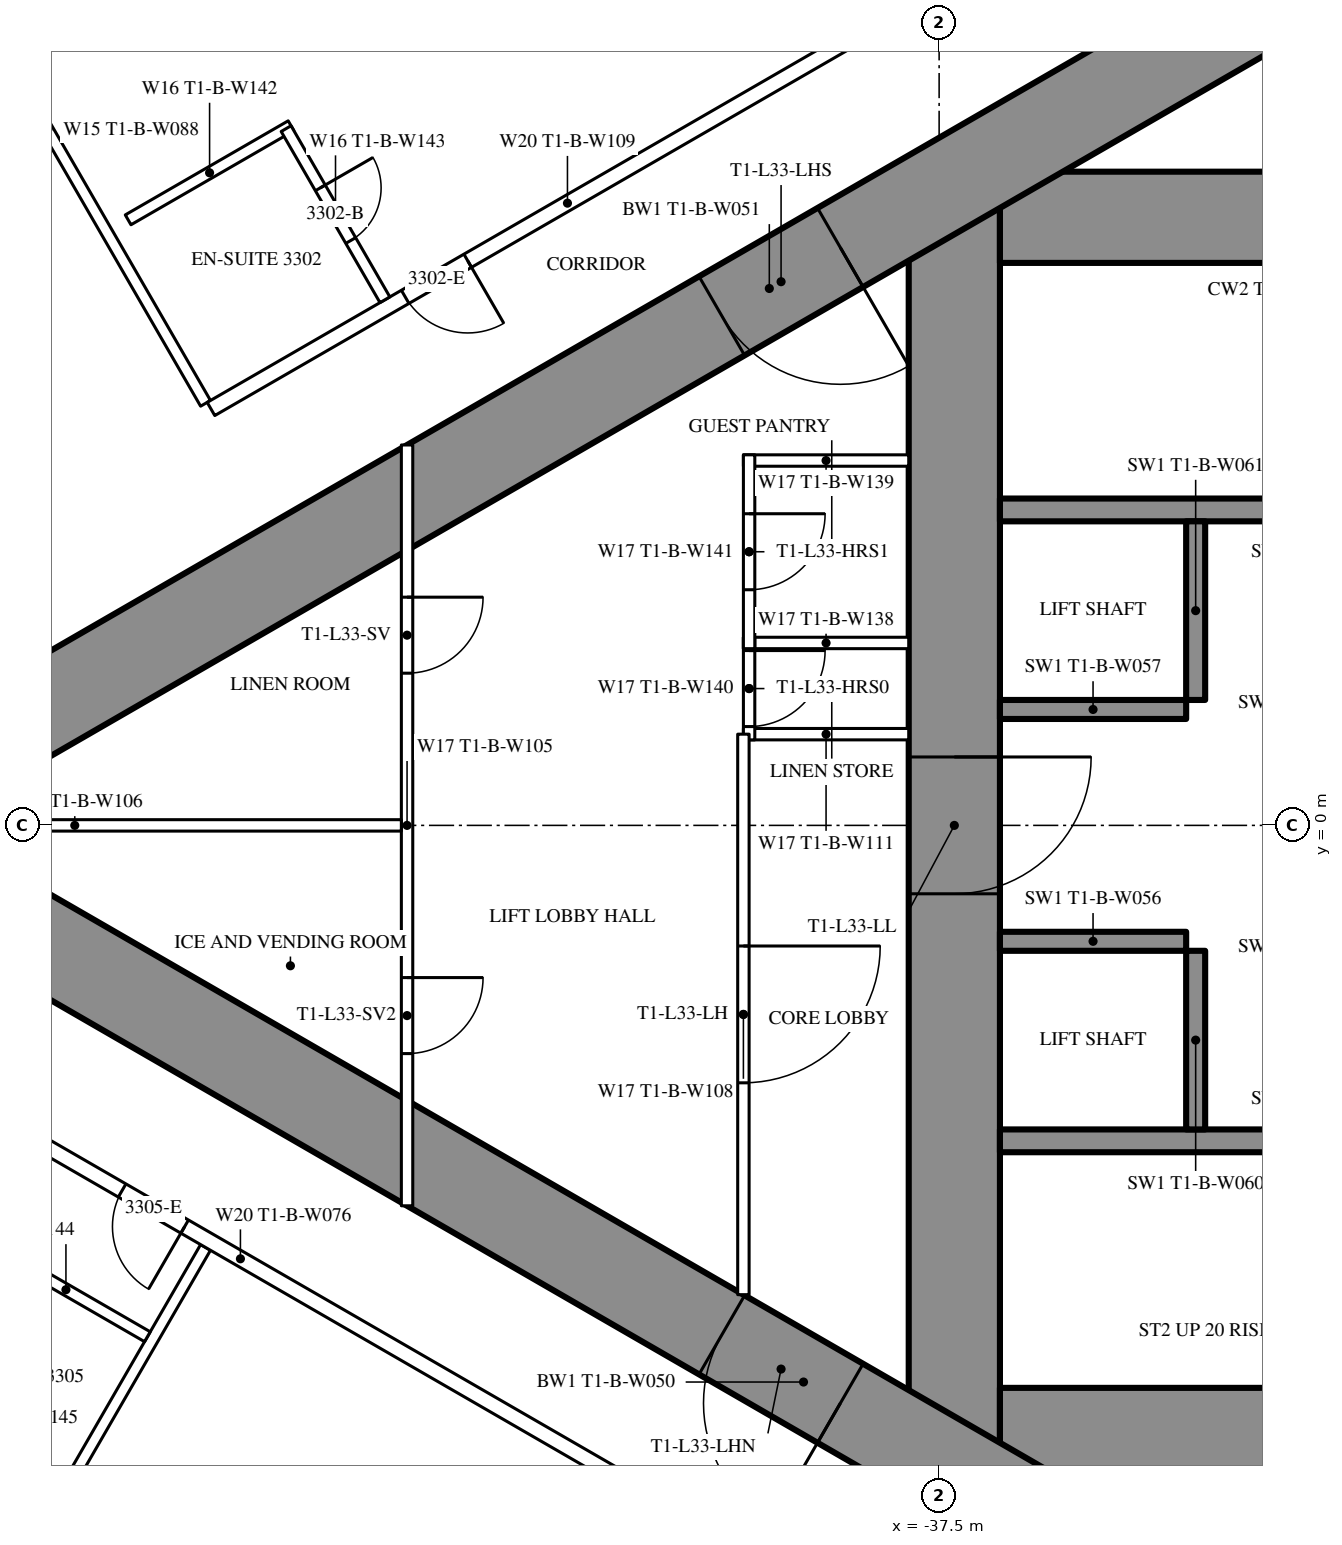
"""IFC4 building model, lengths in metres.
Left out: names, types, materials, properties, quantities, classifications, styles, units other than length and angle.
Written with IfcOpenShell. Run it as: python <this file> out.ifc"""

import sys

from ifc_helpers import new_model, si_unit, direction, frame, frame_2d, origin, place, context, subcontext, project, spatial, rectangle, extrude, element, fill, save


model = new_model("IFC4")
c1 = context("Model", 3, precision=1e-05, world=origin(), true_north=direction((0.0, 1.0)))
c2 = subcontext(c1, "Body", "Model", "MODEL_VIEW")
j1 = project(units=[si_unit("LENGTHUNIT", "METRE"), si_unit("PLANEANGLEUNIT", "RADIAN")], contexts=[c1])
p1 = place(None, origin())
s1 = spatial("IfcSite", under=j1, at=p1, CompositionType="ELEMENT")
p2 = place(p1, origin())
s2 = spatial("IfcBuilding", under=s1, at=p2, CompositionType="ELEMENT")
p3 = place(p2, frame((0.0, 0.0, 125.6)))
s3 = spatial("IfcBuildingStorey", under=s2, at=p3, CompositionType="ELEMENT", Elevation=125.6)
p4 = place(p3, frame((-37.3, 8.6, 0.0), z_axis=(0.0, 0.0, 1.0), x_axis=(0.0, -1.0, 0.0)))
e1 = element("IfcWall", 1, at=p4, inside=s3, PredefinedType="SHEAR", context=c2, shape_type="SweptSolid", body=[
    extrude(rectangle(XDim=17.2, YDim=1.2, at=frame_2d((8.6, 0.0))), origin(), (0.0, 0.0, 1.0), 3.5),
])
p5 = place(p4, frame((7.7, 0.0, 0.0)))
e2 = element("IfcOpeningElement", 2, at=p5, cuts=e1, PredefinedType="OPENING", context=c2, shape_type="SweptSolid", body=[
    extrude(rectangle(XDim=1.8, YDim=2.2, at=frame_2d((0.9, 1.1))), frame((0.0, 0.61, 0.0), z_axis=(0.0, -1.0, 0.0), x_axis=(1.0, 0.0, 0.0)), (0.0, 0.0, 1.0), 1.22),
])
p6 = place(p3, frame((-28.3, 8.0, 0.0), z_axis=(0.0, 0.0, 1.0), x_axis=(-1.0, 0.0, 0.0)))
e3 = element("IfcWall", 3, at=p6, inside=s3, PredefinedType="SHEAR", context=c2, shape_type="SweptSolid", body=[
    extrude(rectangle(XDim=8.4, YDim=1.2, at=frame_2d((4.2, 0.0))), origin(), (0.0, 0.0, 1.0), 3.5),
])
p7 = place(p6, frame((0.25, 0.0, 0.0)))
e4 = element("IfcOpeningElement", 4, at=p7, cuts=e3, PredefinedType="OPENING", context=c2, shape_type="SweptSolid", body=[
    extrude(rectangle(XDim=1.0, YDim=2.2, at=frame_2d((0.5, 1.1))), frame((0.0, 0.61, 0.0), z_axis=(0.0, -1.0, 0.0), x_axis=(1.0, 0.0, 0.0)), (0.0, 0.0, 1.0), 1.22),
])
p8 = place(p3, frame((-28.3, -8.0, 0.0), z_axis=(0.0, 0.0, 1.0), x_axis=(-1.0, 0.0, 0.0)))
e5 = element("IfcWall", 5, at=p8, inside=s3, PredefinedType="SHEAR", context=c2, shape_type="SweptSolid", body=[
    extrude(rectangle(XDim=8.4, YDim=1.2, at=frame_2d((4.2, 0.0))), origin(), (0.0, 0.0, 1.0), 3.5),
])
p9 = place(p8, frame((0.25, 0.0, 0.0)))
e6 = element("IfcOpeningElement", 6, at=p9, cuts=e5, PredefinedType="OPENING", context=c2, shape_type="SweptSolid", body=[
    extrude(rectangle(XDim=1.0, YDim=2.2, at=frame_2d((0.5, 1.1))), frame((0.0, 0.61, 0.0), z_axis=(0.0, -1.0, 0.0), x_axis=(1.0, 0.0, 0.0)), (0.0, 0.0, 1.0), 1.22),
])
for number, where, z_axis, x_axis in (
    (7, (-28.3, 4.15, 0.0), (0.0, 0.0, 1.0), (-1.0, 0.0, 0.0)),
    (8, (-28.3, -4.15, 0.0), (0.0, 0.0, 1.0), (-1.0, 0.0, 0.0)),
):
    element("IfcWall", number, at=place(p3, frame(where, z_axis=z_axis, x_axis=x_axis)), inside=s3, PredefinedType="SHEAR", context=c2, shape_type="SweptSolid", body=[
        extrude(rectangle(XDim=8.4, YDim=0.3, at=frame_2d((4.2, 0.0))), origin(), (0.0, 0.0, 1.0), 3.5),
    ])
p10 = place(p3, frame((-34.125, 4.0, 0.0), z_axis=(0.0, 0.0, 1.0), x_axis=(0.0, -1.0, 0.0)))
e9 = element("IfcWall", 9, at=p10, inside=s3, PredefinedType="SHEAR", context=c2, shape_type="SweptSolid", body=[
    extrude(rectangle(XDim=2.35, YDim=0.25, at=frame_2d((1.175, 0.0))), origin(), (0.0, 0.0, 1.0), 3.5),
])
p11 = place(p3, frame((-34.25, 1.525, 0.0), z_axis=(0.0, 0.0, 1.0), x_axis=(-1.0, 0.0, 0.0)))
e10 = element("IfcWall", 10, at=p11, inside=s3, PredefinedType="SHEAR", context=c2, shape_type="SweptSolid", body=[
    extrude(rectangle(XDim=2.45, YDim=0.25, at=frame_2d((1.225, 0.0))), origin(), (0.0, 0.0, 1.0), 3.5),
])
p12 = place(p3, frame((-34.125, -1.65, 0.0), z_axis=(0.0, 0.0, 1.0), x_axis=(0.0, -1.0, 0.0)))
e11 = element("IfcWall", 11, at=p12, inside=s3, PredefinedType="SHEAR", context=c2, shape_type="SweptSolid", body=[
    extrude(rectangle(XDim=2.35, YDim=0.25, at=frame_2d((1.175, 0.0))), origin(), (0.0, 0.0, 1.0), 3.5),
])
p13 = place(p3, frame((-34.25, -1.525, 0.0), z_axis=(0.0, 0.0, 1.0), x_axis=(-1.0, 0.0, 0.0)))
e12 = element("IfcWall", 12, at=p13, inside=s3, PredefinedType="SHEAR", context=c2, shape_type="SweptSolid", body=[
    extrude(rectangle(XDim=2.45, YDim=0.25, at=frame_2d((1.225, 0.0))), origin(), (0.0, 0.0, 1.0), 3.5),
])
p14 = place(p3, frame((-27.2, 14.3, 0.0), z_axis=(0.0, 0.0, 1.0), x_axis=(-0.866026593062, -0.499997940104, 0.0)))
e13 = element("IfcWall", 13, at=p14, inside=s3, PredefinedType="SHEAR", context=c2, shape_type="SweptSolid", body=[
    extrude(rectangle(XDim=28.946, YDim=1.2, at=frame_2d((14.473, 0.0))), origin(), (0.0, 0.0, 1.0), 3.5),
])
p15 = place(p14, frame((4.6, 0.0, 0.0)))
e14 = element("IfcOpeningElement", 14, at=p15, cuts=e13, PredefinedType="OPENING", context=c2, shape_type="SweptSolid", body=[
    extrude(rectangle(XDim=1.0, YDim=2.2, at=frame_2d((0.5, 1.1))), frame((0.0, 0.61, 0.0), z_axis=(0.0, -1.0, 0.0), x_axis=(1.0, 0.0, 0.0)), (0.0, 0.0, 1.0), 1.22),
])
p16 = place(p14, frame((13.395, 0.0, 0.0)))
e15 = element("IfcOpeningElement", 15, at=p16, cuts=e13, PredefinedType="OPENING", context=c2, shape_type="SweptSolid", body=[
    extrude(rectangle(XDim=1.8, YDim=2.2, at=frame_2d((0.9, 1.1))), frame((0.0, 0.61, 0.0), z_axis=(0.0, -1.0, 0.0), x_axis=(1.0, 0.0, 0.0)), (0.0, 0.0, 1.0), 1.22),
])
p17 = place(p3, frame((-27.2, -14.3, 0.0), z_axis=(0.0, 0.0, 1.0), x_axis=(-0.866024021859, 0.500002393557, 0.0)))
e16 = element("IfcWall", 16, at=p17, inside=s3, PredefinedType="SHEAR", context=c2, shape_type="SweptSolid", body=[
    extrude(rectangle(XDim=27.907, YDim=1.2, at=frame_2d((13.954, 0.0))), origin(), (0.0, 0.0, 1.0), 3.5),
])
p18 = place(p17, frame((4.6, 0.0, 0.0)))
e17 = element("IfcOpeningElement", 17, at=p18, cuts=e16, PredefinedType="OPENING", context=c2, shape_type="SweptSolid", body=[
    extrude(rectangle(XDim=1.0, YDim=2.2, at=frame_2d((0.5, 1.1))), frame((0.0, 0.61, 0.0), z_axis=(0.0, -1.0, 0.0), x_axis=(1.0, 0.0, 0.0)), (0.0, 0.0, 1.0), 1.22),
])
p19 = place(p17, frame((13.395, 0.0, 0.0)))
e18 = element("IfcOpeningElement", 18, at=p19, cuts=e16, PredefinedType="OPENING", context=c2, shape_type="SweptSolid", body=[
    extrude(rectangle(XDim=1.8, YDim=2.2, at=frame_2d((0.9, 1.1))), frame((0.0, 0.61, 0.0), z_axis=(0.0, -1.0, 0.0), x_axis=(1.0, 0.0, 0.0)), (0.0, 0.0, 1.0), 1.22),
])
for number, where, z_axis, x_axis in (
    (19, (-47.151, 5.552, 0.0), (0.0, 0.0, 1.0), (-0.5, 0.866, 0.0)),
    (20, (-47.151, -5.552, 0.0), (0.0, 0.0, 1.0), (-0.5, -0.866, 0.0)),
):
    element("IfcWall", number, at=place(p3, frame(where, z_axis=z_axis, x_axis=x_axis)), inside=s3, PredefinedType="PARTITIONING", context=c2, shape_type="SweptSolid", body=[
        extrude(rectangle(XDim=8.311, YDim=0.15, at=frame_2d((4.156, 0.0))), origin(), (0.0, 0.0, 1.0), 2.2),
    ])
p20 = place(p3, frame((-36.92, -11.344, 0.0), z_axis=(0.0, 0.0, 1.0), x_axis=(-0.866028313256, 0.499994960614, 0.0)))
e21 = element("IfcWall", 21, at=p20, inside=s3, PredefinedType="PARTITIONING", context=c2, shape_type="SweptSolid", body=[
    extrude(rectangle(XDim=22.568, YDim=0.2, at=frame_2d((11.284, 0.0))), origin(), (0.0, 0.0, 1.0), 3.25),
])
p21 = place(p20, frame((12.131, 0.0, 0.0)))
e22 = element("IfcOpeningElement", 22, at=p21, cuts=e21, PredefinedType="OPENING", context=c2, shape_type="SweptSolid", body=[
    extrude(rectangle(XDim=0.95, YDim=2.2, at=frame_2d((0.475, 1.1))), frame((0.0, 0.11, 0.0), z_axis=(0.0, -1.0, 0.0), x_axis=(1.0, 0.0, 0.0)), (0.0, 0.0, 1.0), 0.22),
])
p22 = place(p20, frame((3.35, 0.0, 0.0)))
e23 = element("IfcOpeningElement", 23, at=p22, cuts=e21, PredefinedType="OPENING", context=c2, shape_type="SweptSolid", body=[
    extrude(rectangle(XDim=1.0, YDim=2.2, at=frame_2d((0.5, 1.1))), frame((0.0, 0.11, 0.0), z_axis=(0.0, -1.0, 0.0), x_axis=(1.0, 0.0, 0.0)), (0.0, 0.0, 1.0), 0.22),
])
p23 = place(p3, frame((-37.7, 10.894, 0.0), z_axis=(0.0, 0.0, 1.0), x_axis=(-0.866027551079, -0.499996280759, 0.0)))
e24 = element("IfcWall", 24, at=p23, inside=s3, PredefinedType="PARTITIONING", context=c2, shape_type="SweptSolid", body=[
    extrude(rectangle(XDim=10.831, YDim=0.2, at=frame_2d((5.415, 0.0))), origin(), (0.0, 0.0, 1.0), 3.25),
])
p24 = place(p23, frame((6.93, 0.0, 0.0)))
e25 = element("IfcOpeningElement", 25, at=p24, cuts=e24, PredefinedType="OPENING", context=c2, shape_type="SweptSolid", body=[
    extrude(rectangle(XDim=0.95, YDim=2.2, at=frame_2d((0.475, 1.1))), frame((0.0, 0.11, 0.0), z_axis=(0.0, -1.0, 0.0), x_axis=(1.0, 0.0, 0.0)), (0.0, 0.0, 1.0), 0.22),
])
p25 = place(p3, frame((-47.916, -6.727, 0.0), z_axis=(0.0, 0.0, 1.0), x_axis=(-0.866031185235, 0.4999899861, 0.0)))
e26 = element("IfcWall", 26, at=p25, inside=s3, PredefinedType="PARTITIONING", context=c2, shape_type="SweptSolid", body=[
    extrude(rectangle(XDim=2.475, YDim=0.15, at=frame_2d((1.238, 0.0))), origin(), (0.0, 0.0, 1.0), 3.25),
])
p26 = place(p3, frame((-46.026, 9.204, 0.0), z_axis=(0.0, 0.0, 1.0), x_axis=(-0.866006523861, -0.500032699561, 0.0)))
e27 = element("IfcWall", 27, at=p26, inside=s3, PredefinedType="PARTITIONING", context=c2, shape_type="SweptSolid", body=[
    extrude(rectangle(XDim=2.475, YDim=0.15, at=frame_2d((1.237, 0.0))), origin(), (0.0, 0.0, 1.0), 3.25),
])
p27 = place(p3, frame((-44.791, 6.915, 0.0), z_axis=(0.0, 0.0, 1.0), x_axis=(-0.500047596559, 0.865997922154, 0.0)))
e28 = element("IfcWall", 28, at=p27, inside=s3, PredefinedType="PARTITIONING", context=c2, shape_type="SweptSolid", body=[
    extrude(rectangle(XDim=2.6, YDim=0.15, at=frame_2d((1.3, 0.0))), origin(), (0.0, 0.0, 1.0), 3.25),
])
p28 = place(p27, frame((0.9, 0.0, 0.0)))
e29 = element("IfcOpeningElement", 29, at=p28, cuts=e28, PredefinedType="OPENING", context=c2, shape_type="SweptSolid", body=[
    extrude(rectangle(XDim=0.8, YDim=2.2, at=frame_2d((0.4, 1.1))), frame((0.0, 0.085, 0.0), z_axis=(0.0, -1.0, 0.0), x_axis=(1.0, 0.0, 0.0)), (0.0, 0.0, 1.0), 0.17),
])
for number, where, z_axis, x_axis in (
    (30, (-37.9, 1.2, 0.0), (0.0, 0.0, 1.0), (-1.0, 0.0, 0.0)),
    (31, (-37.9, 2.4, 0.0), (0.0, 0.0, 1.0), (-1.0, 0.0, 0.0)),
    (32, (-37.9, 4.8, 0.0), (0.0, 0.0, 1.0), (-1.0, 0.0, 0.0)),
):
    element("IfcWall", number, at=place(p3, frame(where, z_axis=z_axis, x_axis=x_axis)), inside=s3, PredefinedType="PARTITIONING", context=c2, shape_type="SweptSolid", body=[
        extrude(rectangle(XDim=2.175, YDim=0.15, at=frame_2d((1.087, 0.0))), origin(), (0.0, 0.0, 1.0), 3.25),
    ])
p29 = place(p3, frame((-40.0, 2.475, 0.0), z_axis=(0.0, 0.0, 1.0), x_axis=(0.0, -1.0, 0.0)))
e33 = element("IfcWall", 33, at=p29, inside=s3, PredefinedType="PARTITIONING", context=c2, shape_type="SweptSolid", body=[
    extrude(rectangle(XDim=1.35, YDim=0.15, at=frame_2d((0.675, 0.0))), origin(), (0.0, 0.0, 1.0), 3.25),
])
p30 = place(p29, frame((0.175, 0.0, 0.0)))
e34 = element("IfcOpeningElement", 34, at=p30, cuts=e33, PredefinedType="OPENING", context=c2, shape_type="SweptSolid", body=[
    extrude(rectangle(XDim=1.0, YDim=2.2, at=frame_2d((0.5, 1.1))), frame((0.0, 0.085, 0.0), z_axis=(0.0, -1.0, 0.0), x_axis=(1.0, 0.0, 0.0)), (0.0, 0.0, 1.0), 0.17),
])
p31 = place(p3, frame((-40.0, 4.875, 0.0), z_axis=(0.0, 0.0, 1.0), x_axis=(0.0, -1.0, 0.0)))
e35 = element("IfcWall", 35, at=p31, inside=s3, PredefinedType="PARTITIONING", context=c2, shape_type="SweptSolid", body=[
    extrude(rectangle(XDim=2.55, YDim=0.15, at=frame_2d((1.275, 0.0))), origin(), (0.0, 0.0, 1.0), 3.25),
])
p32 = place(p31, frame((0.775, 0.0, 0.0)))
e36 = element("IfcOpeningElement", 36, at=p32, cuts=e35, PredefinedType="OPENING", context=c2, shape_type="SweptSolid", body=[
    extrude(rectangle(XDim=1.0, YDim=2.2, at=frame_2d((0.5, 1.1))), frame((0.0, 0.085, 0.0), z_axis=(0.0, -1.0, 0.0), x_axis=(1.0, 0.0, 0.0)), (0.0, 0.0, 1.0), 0.17),
])
p33 = place(p3, frame((-40.075, 1.2, 0.0), z_axis=(0.0, 0.0, 1.0), x_axis=(0.0, -1.0, 0.0)))
e37 = element("IfcWall", 37, at=p33, inside=s3, PredefinedType="PARTITIONING", context=c2, shape_type="SweptSolid", body=[
    extrude(rectangle(XDim=7.374, YDim=0.15, at=frame_2d((3.687, 0.0))), origin(), (0.0, 0.0, 1.0), 3.25),
])
p34 = place(p33, frame((2.787, 0.0, 0.0)))
e38 = element("IfcOpeningElement", 38, at=p34, cuts=e37, PredefinedType="OPENING", context=c2, shape_type="SweptSolid", body=[
    extrude(rectangle(XDim=1.8, YDim=2.2, at=frame_2d((0.9, 1.1))), frame((0.0, 0.085, 0.0), z_axis=(0.0, -1.0, 0.0), x_axis=(1.0, 0.0, 0.0)), (0.0, 0.0, 1.0), 0.17),
])
p35 = place(p3, frame((-44.5, 5.005, 0.0), z_axis=(0.0, 0.0, 1.0), x_axis=(0.0, -1.0, 0.0)))
e39 = element("IfcWall", 39, at=p35, inside=s3, PredefinedType="PARTITIONING", context=c2, shape_type="SweptSolid", body=[
    extrude(rectangle(XDim=10.009, YDim=0.15, at=frame_2d((5.005, 0.0))), origin(), (0.0, 0.0, 1.0), 2.45),
])
p36 = place(p35, frame((2.002, 0.0, 0.0)))
e40 = element("IfcOpeningElement", 40, at=p36, cuts=e39, PredefinedType="OPENING", context=c2, shape_type="SweptSolid", body=[
    extrude(rectangle(XDim=1.0, YDim=2.2, at=frame_2d((0.5, 1.1))), frame((0.0, 0.085, 0.0), z_axis=(0.0, -1.0, 0.0), x_axis=(1.0, 0.0, 0.0)), (0.0, 0.0, 1.0), 0.17),
])
p37 = place(p35, frame((7.007, 0.0, 0.0)))
e41 = element("IfcOpeningElement", 41, at=p37, cuts=e39, PredefinedType="OPENING", context=c2, shape_type="SweptSolid", body=[
    extrude(rectangle(XDim=1.0, YDim=2.2, at=frame_2d((0.5, 1.1))), frame((0.0, 0.085, 0.0), z_axis=(0.0, -1.0, 0.0), x_axis=(1.0, 0.0, 0.0)), (0.0, 0.0, 1.0), 0.17),
])
p38 = place(p3, frame((-44.575, 0.0, 0.0), z_axis=(0.0, 0.0, 1.0), x_axis=(-1.0, 0.0, 0.0)))
e42 = element("IfcWall", 42, at=p38, inside=s3, PredefinedType="PARTITIONING", context=c2, shape_type="SweptSolid", body=[
    extrude(rectangle(XDim=8.593, YDim=0.15, at=frame_2d((4.297, 0.0))), origin(), (0.0, 0.0, 1.0), 2.2),
])
p39 = place(p21, origin())
e43 = element("IfcDoor", 43, at=p39, inside=s3, OperationType="SINGLE_SWING_LEFT", PredefinedType="DOOR", context=c2, shape_type="SweptSolid", body=[
    extrude(rectangle(XDim=0.95, YDim=2.2, at=frame_2d((0.475, 1.1))), frame((0.0, 0.025, 0.0), z_axis=(0.0, -1.0, 0.0), x_axis=(1.0, 0.0, 0.0)), (0.0, 0.0, 1.0), 0.05),
])
fill(e22, e43)
p40 = place(p28, origin())
e44 = element("IfcDoor", 44, at=p40, inside=s3, OperationType="SINGLE_SWING_RIGHT", PredefinedType="DOOR", context=c2, shape_type="SweptSolid", body=[
    extrude(rectangle(XDim=0.8, YDim=2.2, at=frame_2d((0.4, 1.1))), frame((0.0, 0.025, 0.0), z_axis=(0.0, -1.0, 0.0), x_axis=(1.0, 0.0, 0.0)), (0.0, 0.0, 1.0), 0.05),
])
fill(e29, e44)
p41 = place(p24, origin())
e45 = element("IfcDoor", 45, at=p41, inside=s3, OperationType="SINGLE_SWING_LEFT", PredefinedType="DOOR", context=c2, shape_type="SweptSolid", body=[
    extrude(rectangle(XDim=0.95, YDim=2.2, at=frame_2d((0.475, 1.1))), frame((0.0, 0.025, 0.0), z_axis=(0.0, -1.0, 0.0), x_axis=(1.0, 0.0, 0.0)), (0.0, 0.0, 1.0), 0.05),
])
fill(e25, e45)
p42 = place(p30, origin())
e46 = element("IfcDoor", 46, at=p42, inside=s3, OperationType="SINGLE_SWING_LEFT", PredefinedType="DOOR", context=c2, shape_type="SweptSolid", body=[
    extrude(rectangle(XDim=1.0, YDim=2.2, at=frame_2d((0.5, 1.1))), frame((0.0, 0.025, 0.0), z_axis=(0.0, -1.0, 0.0), x_axis=(1.0, 0.0, 0.0)), (0.0, 0.0, 1.0), 0.05),
])
fill(e34, e46)
p43 = place(p32, origin())
e47 = element("IfcDoor", 47, at=p43, inside=s3, OperationType="SINGLE_SWING_LEFT", PredefinedType="DOOR", context=c2, shape_type="SweptSolid", body=[
    extrude(rectangle(XDim=1.0, YDim=2.2, at=frame_2d((0.5, 1.1))), frame((0.0, 0.025, 0.0), z_axis=(0.0, -1.0, 0.0), x_axis=(1.0, 0.0, 0.0)), (0.0, 0.0, 1.0), 0.05),
])
fill(e36, e47)
p44 = place(p34, origin())
e48 = element("IfcDoor", 48, at=p44, inside=s3, OperationType="DOUBLE_DOOR_SINGLE_SWING", PredefinedType="DOOR", context=c2, shape_type="SweptSolid", body=[
    extrude(rectangle(XDim=1.8, YDim=2.2, at=frame_2d((0.9, 1.1))), frame((0.0, 0.025, 0.0), z_axis=(0.0, -1.0, 0.0), x_axis=(1.0, 0.0, 0.0)), (0.0, 0.0, 1.0), 0.05),
])
fill(e38, e48)
p45 = place(p36, origin())
e49 = element("IfcDoor", 49, at=p45, inside=s3, OperationType="SINGLE_SWING_LEFT", PredefinedType="DOOR", context=c2, shape_type="SweptSolid", body=[
    extrude(rectangle(XDim=1.0, YDim=2.2, at=frame_2d((0.5, 1.1))), frame((0.0, 0.025, 0.0), z_axis=(0.0, -1.0, 0.0), x_axis=(1.0, 0.0, 0.0)), (0.0, 0.0, 1.0), 0.05),
])
fill(e40, e49)
p46 = place(p37, origin())
e50 = element("IfcDoor", 50, at=p46, inside=s3, OperationType="SINGLE_SWING_LEFT", PredefinedType="DOOR", context=c2, shape_type="SweptSolid", body=[
    extrude(rectangle(XDim=1.0, YDim=2.2, at=frame_2d((0.5, 1.1))), frame((0.0, 0.025, 0.0), z_axis=(0.0, -1.0, 0.0), x_axis=(1.0, 0.0, 0.0)), (0.0, 0.0, 1.0), 0.05),
])
fill(e41, e50)
p47 = place(p16, origin())
e51 = element("IfcDoor", 51, at=p47, inside=s3, OperationType="DOUBLE_DOOR_SINGLE_SWING", PredefinedType="DOOR", context=c2, shape_type="SweptSolid", body=[
    extrude(rectangle(XDim=1.8, YDim=2.2, at=frame_2d((0.9, 1.1))), frame((0.0, 0.025, 0.0), z_axis=(0.0, -1.0, 0.0), x_axis=(1.0, 0.0, 0.0)), (0.0, 0.0, 1.0), 0.05),
])
fill(e15, e51)
p48 = place(p19, origin())
e52 = element("IfcDoor", 52, at=p48, inside=s3, OperationType="DOUBLE_DOOR_SINGLE_SWING", PredefinedType="DOOR", context=c2, shape_type="SweptSolid", body=[
    extrude(rectangle(XDim=1.8, YDim=2.2, at=frame_2d((0.9, 1.1))), frame((0.0, 0.025, 0.0), z_axis=(0.0, -1.0, 0.0), x_axis=(1.0, 0.0, 0.0)), (0.0, 0.0, 1.0), 0.05),
])
fill(e18, e52)
p49 = place(p5, origin())
e53 = element("IfcDoor", 53, at=p49, inside=s3, OperationType="DOUBLE_DOOR_SINGLE_SWING", PredefinedType="DOOR", context=c2, shape_type="SweptSolid", body=[
    extrude(rectangle(XDim=1.8, YDim=2.2, at=frame_2d((0.9, 1.1))), frame((0.0, 0.025, 0.0), z_axis=(0.0, -1.0, 0.0), x_axis=(1.0, 0.0, 0.0)), (0.0, 0.0, 1.0), 0.05),
])
fill(e2, e53)
save(model, sys.argv[1])
